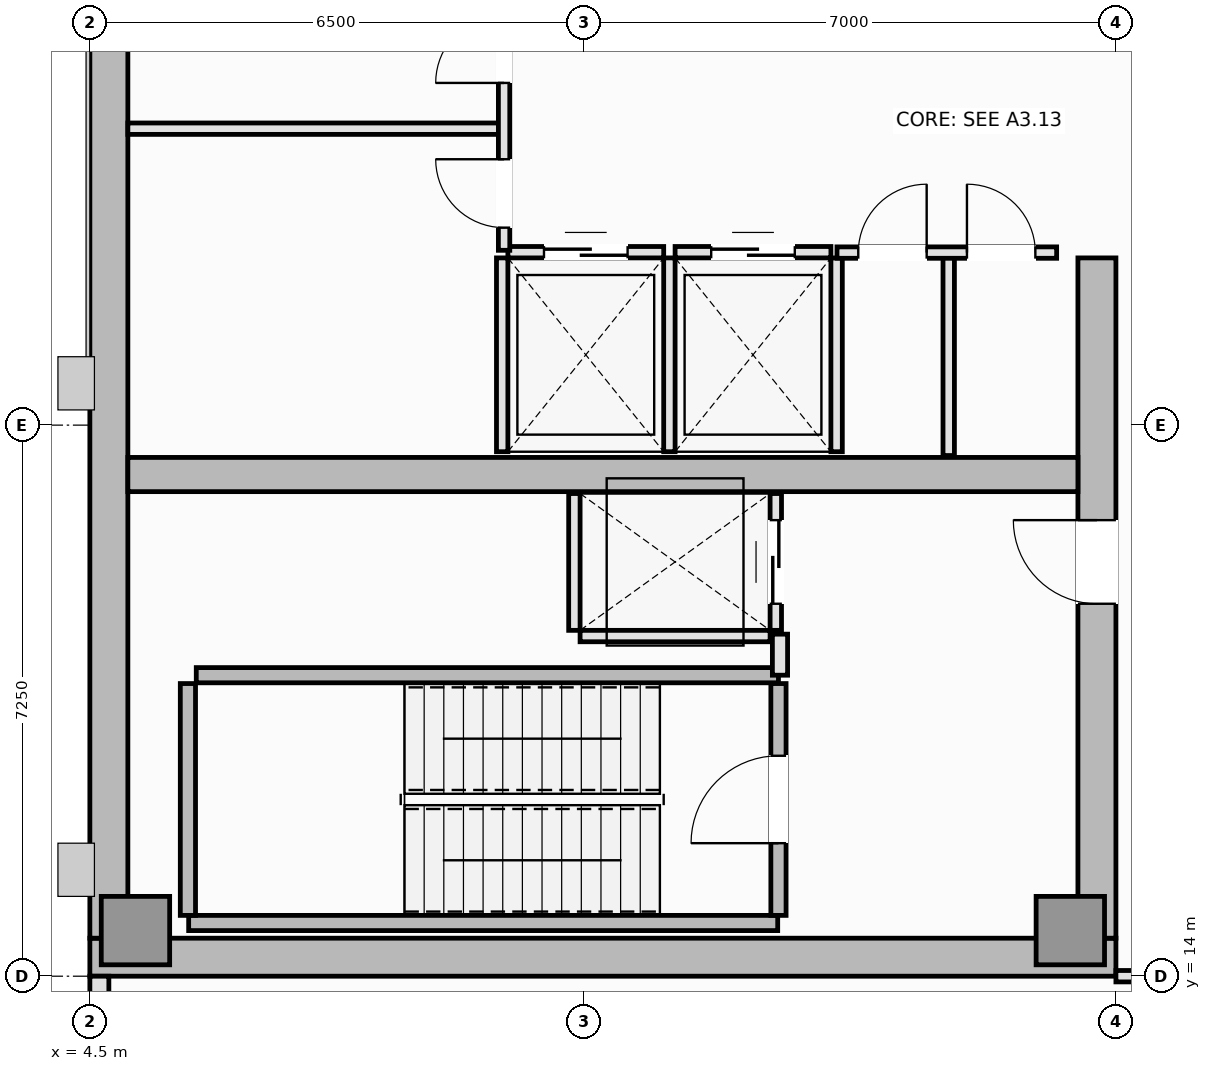
"""IFC4 building model, lengths in metres.
Left out: names, types, materials, properties, quantities, classifications, styles, units other than length and angle.
Written with IfcOpenShell. Run it as: python <this file> out.ifc"""

import sys

from ifc_helpers import new_model, si_unit, direction, frame, frame_2d, origin, origin_2d, place, context, subcontext, project, spatial, rectangle, extrude, element, fill, save


model = new_model("IFC4")
c1 = context("Model", 3, precision=1e-05, world=origin(), true_north=direction((0.0, 1.0)))
c2 = subcontext(c1, "Body", "Model", "MODEL_VIEW")
j1 = project(units=[si_unit("LENGTHUNIT", "METRE"), si_unit("PLANEANGLEUNIT", "RADIAN")], contexts=[c1])
p1 = place(None, origin())
s1 = spatial("IfcSite", under=j1, at=p1, CompositionType="ELEMENT")
p2 = place(p1, origin())
s2 = spatial("IfcBuilding", under=s1, at=p2, CompositionType="ELEMENT")
p3 = place(p2, frame((0.0, 0.0, 244.85)))
s3 = spatial("IfcBuildingStorey", under=s2, at=p3, CompositionType="ELEMENT", Elevation=244.85)
p4 = place(p3, frame((4.5, 14.25, 0.0), z_axis=(0.0, 0.0, 1.0), x_axis=(1.0, 0.0, 0.0)))
e1 = element("IfcWall", 1, at=p4, inside=s3, PredefinedType="SHEAR", context=c2, shape_type="SweptSolid", body=[
    extrude(rectangle(XDim=13.5, YDim=0.5, at=frame_2d((6.75, 0.0))), origin(), (0.0, 0.0, 1.0), 4.4),
])
p5 = place(p3, frame((4.75, 14.5, 0.0), z_axis=(0.0, 0.0, 1.0), x_axis=(0.0, 1.0, 0.0)))
e2 = element("IfcWall", 2, at=p5, inside=s3, PredefinedType="SHEAR", context=c2, shape_type="SweptSolid", body=[
    extrude(rectangle(XDim=21.5, YDim=0.5, at=frame_2d((10.75, 0.0))), origin(), (0.0, 0.0, 1.0), 4.4),
])
p6 = place(p3, frame((17.75, 14.5, 0.0), z_axis=(0.0, 0.0, 1.0), x_axis=(0.0, 1.0, 0.0)))
e3 = element("IfcWall", 3, at=p6, inside=s3, PredefinedType="SHEAR", context=c2, shape_type="SweptSolid", body=[
    extrude(rectangle(XDim=8.95, YDim=0.5, at=frame_2d((4.475, 0.0))), origin(), (0.0, 0.0, 1.0), 4.4),
])
p7 = place(p6, frame((4.4, 0.0, 0.0)))
e4 = element("IfcOpeningElement", 4, at=p7, cuts=e3, PredefinedType="OPENING", context=c2, shape_type="SweptSolid", body=[
    extrude(rectangle(XDim=1.1, YDim=2.15, at=frame_2d((0.55, 1.075))), frame((0.0, 0.26, 0.0), z_axis=(0.0, -1.0, 0.0), x_axis=(1.0, 0.0, 0.0)), (0.0, 0.0, 1.0), 0.52),
])
p8 = place(p3, frame((5.0, 20.6, 0.0), z_axis=(0.0, 0.0, 1.0), x_axis=(1.0, 0.0, 0.0)))
e5 = element("IfcWall", 5, at=p8, inside=s3, PredefinedType="SHEAR", context=c2, shape_type="SweptSolid", body=[
    extrude(rectangle(XDim=12.5, YDim=0.45, at=frame_2d((6.25, 0.0))), origin(), (0.0, 0.0, 1.0), 4.4),
])
for number, where, z_axis, x_axis in (
    (6, (5.1, 14.6, 0.0), (0.0, 0.0, 1.0), (1.0, 0.0, 0.0)),
    (7, (17.4, 14.6, 0.0), (0.0, 0.0, 1.0), (1.0, 0.0, 0.0)),
):
    element("IfcColumn", number, at=place(p3, frame(where, z_axis=z_axis, x_axis=x_axis)), inside=s3, PredefinedType="PILASTER", context=c2, shape_type="SweptSolid", body=[
        extrude(rectangle(XDim=0.9, YDim=0.9, at=origin_2d()), origin(), (0.0, 0.0, 1.0), 4.4),
    ])
p9 = place(p3, frame((4.625, 14.0, 0.0), z_axis=(0.0, 0.0, 1.0), x_axis=(0.0, -1.0, 0.0)))
e8 = element("IfcWall", 8, at=p9, inside=s3, PredefinedType="SOLIDWALL", context=c2, shape_type="SweptSolid", body=[
    extrude(rectangle(XDim=3.4, YDim=0.25, at=frame_2d((1.7, 0.0))), origin(), (0.0, 0.0, 1.0), 4.24),
])
p10 = place(p9, frame((0.6, 0.0, 0.9)))
e9 = element("IfcOpeningElement", 9, at=p10, cuts=e8, PredefinedType="OPENING", context=c2, shape_type="SweptSolid", body=[
    extrude(rectangle(XDim=2.2, YDim=1.8, at=frame_2d((1.1, 0.9))), frame((0.0, 0.135, 0.0), z_axis=(0.0, -1.0, 0.0), x_axis=(1.0, 0.0, 0.0)), (0.0, 0.0, 1.0), 0.27),
])
p11 = place(p3, frame((5.8, 14.7, 0.0), z_axis=(0.0, 0.0, 1.0), x_axis=(1.0, 0.0, 0.0)))
e10 = element("IfcWall", 10, at=p11, inside=s3, PredefinedType="SOLIDWALL", context=c2, shape_type="SweptSolid", body=[
    extrude(rectangle(XDim=7.75, YDim=0.2, at=frame_2d((3.875, 0.0))), origin(), (0.0, 0.0, 1.0), 4.4),
])
p12 = place(p3, frame((5.79, 14.8, 0.0), z_axis=(0.0, 0.0, 1.0), x_axis=(0.0, 1.0, 0.0)))
e11 = element("IfcWall", 11, at=p12, inside=s3, PredefinedType="SOLIDWALL", context=c2, shape_type="SweptSolid", body=[
    extrude(rectangle(XDim=3.05, YDim=0.2, at=frame_2d((1.525, 0.0))), origin(), (0.0, 0.0, 1.0), 4.4),
])
p13 = place(p3, frame((5.9, 17.96, 0.0), z_axis=(0.0, 0.0, 1.0), x_axis=(1.0, 0.0, 0.0)))
e12 = element("IfcWall", 12, at=p13, inside=s3, PredefinedType="SOLIDWALL", context=c2, shape_type="SweptSolid", body=[
    extrude(rectangle(XDim=7.66, YDim=0.2, at=frame_2d((3.83, 0.0))), origin(), (0.0, 0.0, 1.0), 4.4),
])
p14 = place(p3, frame((13.56, 14.8, 0.0), z_axis=(0.0, 0.0, 1.0), x_axis=(0.0, 1.0, 0.0)))
e13 = element("IfcWall", 13, at=p14, inside=s3, PredefinedType="SOLIDWALL", context=c2, shape_type="SweptSolid", body=[
    extrude(rectangle(XDim=3.05, YDim=0.2, at=frame_2d((1.525, 0.0))), origin(), (0.0, 0.0, 1.0), 4.4),
])
p15 = place(p14, frame((0.95, 0.0, 0.0)))
e14 = element("IfcOpeningElement", 14, at=p15, cuts=e13, PredefinedType="OPENING", context=c2, shape_type="SweptSolid", body=[
    extrude(rectangle(XDim=1.15, YDim=2.15, at=frame_2d((0.575, 1.075))), frame((0.0, 0.11, 0.0), z_axis=(0.0, -1.0, 0.0), x_axis=(1.0, 0.0, 0.0)), (0.0, 0.0, 1.0), 0.22),
])
p16 = place(p3, frame((10.0, 23.525, 0.0), z_axis=(0.0, 0.0, 1.0), x_axis=(1.0, 0.0, 0.0)))
e15 = element("IfcWall", 15, at=p16, inside=s3, PredefinedType="PARTITIONING", context=c2, shape_type="SweptSolid", body=[
    extrude(rectangle(XDim=2.05, YDim=0.15, at=frame_2d((1.025, 0.0))), origin(), (0.0, 0.0, 1.0), 4.24),
])
p17 = place(p16, frame((0.475, 0.0, 0.0)))
e16 = element("IfcOpeningElement", 16, at=p17, cuts=e15, PredefinedType="OPENING", context=c2, shape_type="SweptSolid", body=[
    extrude(rectangle(XDim=1.1, YDim=2.2, at=frame_2d((0.55, 1.1))), frame((0.0, 0.085, 0.0), z_axis=(0.0, -1.0, 0.0), x_axis=(1.0, 0.0, 0.0)), (0.0, 0.0, 1.0), 0.17),
])
for number, where, z_axis, x_axis in (
    (17, (9.925, 20.9, 0.0), (0.0, 0.0, 1.0), (0.0, 1.0, 0.0)),
    (18, (12.125, 20.9, 0.0), (0.0, 0.0, 1.0), (0.0, 1.0, 0.0)),
):
    element("IfcWall", number, at=place(p3, frame(where, z_axis=z_axis, x_axis=x_axis)), inside=s3, PredefinedType="PARTITIONING", context=c2, shape_type="SweptSolid", body=[
        extrude(rectangle(XDim=2.55, YDim=0.15, at=frame_2d((1.275, 0.0))), origin(), (0.0, 0.0, 1.0), 4.24),
    ])
p18 = place(p3, frame((12.2, 23.525, 0.0), z_axis=(0.0, 0.0, 1.0), x_axis=(1.0, 0.0, 0.0)))
e19 = element("IfcWall", 19, at=p18, inside=s3, PredefinedType="PARTITIONING", context=c2, shape_type="SweptSolid", body=[
    extrude(rectangle(XDim=2.05, YDim=0.15, at=frame_2d((1.025, 0.0))), origin(), (0.0, 0.0, 1.0), 4.24),
])
p19 = place(p18, frame((0.475, 0.0, 0.0)))
e20 = element("IfcOpeningElement", 20, at=p19, cuts=e19, PredefinedType="OPENING", context=c2, shape_type="SweptSolid", body=[
    extrude(rectangle(XDim=1.1, YDim=2.2, at=frame_2d((0.55, 1.1))), frame((0.0, 0.085, 0.0), z_axis=(0.0, -1.0, 0.0), x_axis=(1.0, 0.0, 0.0)), (0.0, 0.0, 1.0), 0.17),
])
p20 = place(p3, frame((14.325, 20.9, 0.0), z_axis=(0.0, 0.0, 1.0), x_axis=(0.0, 1.0, 0.0)))
e21 = element("IfcWall", 21, at=p20, inside=s3, PredefinedType="PARTITIONING", context=c2, shape_type="SweptSolid", body=[
    extrude(rectangle(XDim=2.55, YDim=0.15, at=frame_2d((1.275, 0.0))), origin(), (0.0, 0.0, 1.0), 4.24),
])
p21 = place(p3, frame((10.95, 18.475, 0.0), z_axis=(0.0, 0.0, 1.0), x_axis=(1.0, 0.0, 0.0)))
e22 = element("IfcWall", 22, at=p21, inside=s3, PredefinedType="PARTITIONING", context=c2, shape_type="SweptSolid", body=[
    extrude(rectangle(XDim=2.5, YDim=0.15, at=frame_2d((1.25, 0.0))), origin(), (0.0, 0.0, 1.0), 4.24),
])
p22 = place(p3, frame((10.875, 18.55, 0.0), z_axis=(0.0, 0.0, 1.0), x_axis=(0.0, 1.0, 0.0)))
e23 = element("IfcWall", 23, at=p22, inside=s3, PredefinedType="PARTITIONING", context=c2, shape_type="SweptSolid", body=[
    extrude(rectangle(XDim=1.8, YDim=0.15, at=frame_2d((0.9, 0.0))), origin(), (0.0, 0.0, 1.0), 4.24),
])
p23 = place(p3, frame((13.525, 18.55, 0.0), z_axis=(0.0, 0.0, 1.0), x_axis=(0.0, 1.0, 0.0)))
e24 = element("IfcWall", 24, at=p23, inside=s3, PredefinedType="PARTITIONING", context=c2, shape_type="SweptSolid", body=[
    extrude(rectangle(XDim=1.8, YDim=0.15, at=frame_2d((0.9, 0.0))), origin(), (0.0, 0.0, 1.0), 4.24),
])
p24 = place(p23, frame((0.35, 0.0, 0.0)))
e25 = element("IfcOpeningElement", 25, at=p24, cuts=e24, PredefinedType="OPENING", context=c2, shape_type="SweptSolid", body=[
    extrude(rectangle(XDim=1.1, YDim=2.2, at=frame_2d((0.55, 1.1))), frame((0.0, 0.085, 0.0), z_axis=(0.0, -1.0, 0.0), x_axis=(1.0, 0.0, 0.0)), (0.0, 0.0, 1.0), 0.17),
])
p25 = place(p3, frame((13.58, 17.96, 0.0), z_axis=(0.0, 0.0, 1.0), x_axis=(0.0, 1.0, 0.0)))
e26 = element("IfcWall", 26, at=p25, inside=s3, PredefinedType="PARTITIONING", context=c2, shape_type="SweptSolid", body=[
    extrude(rectangle(XDim=0.54, YDim=0.2, at=frame_2d((0.27, 0.0))), origin(), (0.0, 0.0, 1.0), 4.24),
])
p26 = place(p3, frame((5.0, 25.15, 0.0), z_axis=(0.0, 0.0, 1.0), x_axis=(1.0, 0.0, 0.0)))
e27 = element("IfcWall", 27, at=p26, inside=s3, PredefinedType="PARTITIONING", context=c2, shape_type="SweptSolid", body=[
    extrude(rectangle(XDim=4.95, YDim=0.15, at=frame_2d((2.475, 0.0))), origin(), (0.0, 0.0, 1.0), 4.24),
])
p27 = place(p3, frame((9.95, 23.55, 0.0), z_axis=(0.0, 0.0, 1.0), x_axis=(0.0, 1.0, 0.0)))
e28 = element("IfcWall", 28, at=p27, inside=s3, PredefinedType="PARTITIONING", context=c2, shape_type="SweptSolid", body=[
    extrude(rectangle(XDim=3.4, YDim=0.15, at=frame_2d((1.7, 0.0))), origin(), (0.0, 0.0, 1.0), 4.24),
])
p28 = place(p27, frame((0.298, 0.0, 0.0)))
e29 = element("IfcOpeningElement", 29, at=p28, cuts=e28, PredefinedType="OPENING", context=c2, shape_type="SweptSolid", body=[
    extrude(rectangle(XDim=0.9, YDim=2.1, at=frame_2d((0.45, 1.05))), frame((0.0, 0.085, 0.0), z_axis=(0.0, -1.0, 0.0), x_axis=(1.0, 0.0, 0.0)), (0.0, 0.0, 1.0), 0.17),
])
p29 = place(p27, frame((2.202, 0.0, 0.0)))
e30 = element("IfcOpeningElement", 30, at=p29, cuts=e28, PredefinedType="OPENING", context=c2, shape_type="SweptSolid", body=[
    extrude(rectangle(XDim=0.9, YDim=2.1, at=frame_2d((0.45, 1.05))), frame((0.0, 0.085, 0.0), z_axis=(0.0, -1.0, 0.0), x_axis=(1.0, 0.0, 0.0)), (0.0, 0.0, 1.0), 0.17),
])
p30 = place(p3, frame((15.8, 20.85, 0.0), z_axis=(0.0, 0.0, 1.0), x_axis=(0.0, 1.0, 0.0)))
e31 = element("IfcWall", 31, at=p30, inside=s3, PredefinedType="PARTITIONING", context=c2, shape_type="SweptSolid", body=[
    extrude(rectangle(XDim=2.67, YDim=0.15, at=frame_2d((1.335, 0.0))), origin(), (0.0, 0.0, 1.0), 4.24),
])
p31 = place(p3, frame((14.33, 23.52, 0.0), z_axis=(0.0, 0.0, 1.0), x_axis=(1.0, 0.0, 0.0)))
e32 = element("IfcWall", 32, at=p31, inside=s3, PredefinedType="PARTITIONING", context=c2, shape_type="SweptSolid", body=[
    extrude(rectangle(XDim=2.89, YDim=0.15, at=frame_2d((1.445, 0.0))), origin(), (0.0, 0.0, 1.0), 4.24),
])
p32 = place(p31, frame((0.28, 0.0, 0.0)))
e33 = element("IfcOpeningElement", 33, at=p32, cuts=e32, PredefinedType="OPENING", context=c2, shape_type="SweptSolid", body=[
    extrude(rectangle(XDim=0.9, YDim=2.1, at=frame_2d((0.45, 1.05))), frame((0.0, 0.085, 0.0), z_axis=(0.0, -1.0, 0.0), x_axis=(1.0, 0.0, 0.0)), (0.0, 0.0, 1.0), 0.17),
])
p33 = place(p31, frame((1.71, 0.0, 0.0)))
e34 = element("IfcOpeningElement", 34, at=p33, cuts=e32, PredefinedType="OPENING", context=c2, shape_type="SweptSolid", body=[
    extrude(rectangle(XDim=0.9, YDim=2.1, at=frame_2d((0.45, 1.05))), frame((0.0, 0.085, 0.0), z_axis=(0.0, -1.0, 0.0), x_axis=(1.0, 0.0, 0.0)), (0.0, 0.0, 1.0), 0.17),
])
p34 = place(p3, frame((18.0, 14.0, 0.0), z_axis=(0.0, 0.0, 1.0), x_axis=(1.0, 0.0, 0.0)))
e35 = element("IfcWall", 35, at=p34, inside=s3, PredefinedType="PARTITIONING", context=c2, shape_type="SweptSolid", body=[
    extrude(rectangle(XDim=2.2, YDim=0.15, at=frame_2d((1.1, 0.0))), origin(), (0.0, 0.0, 1.0), 4.24),
])
p35 = place(p34, frame((0.65, 0.0, 0.0)))
e36 = element("IfcOpeningElement", 36, at=p35, cuts=e35, PredefinedType="OPENING", context=c2, shape_type="SweptSolid", body=[
    extrude(rectangle(XDim=0.9, YDim=2.1, at=frame_2d((0.45, 1.05))), frame((0.0, 0.085, 0.0), z_axis=(0.0, -1.0, 0.0), x_axis=(1.0, 0.0, 0.0)), (0.0, 0.0, 1.0), 0.17),
])
p36 = place(p15, origin())
e37 = element("IfcDoor", 37, at=p36, inside=s3, OperationType="SINGLE_SWING_LEFT", PredefinedType="DOOR", context=c2, shape_type="SweptSolid", body=[
    extrude(rectangle(XDim=1.15, YDim=2.15, at=frame_2d((0.575, 1.075))), frame((0.0, 0.025, 0.0), z_axis=(0.0, -1.0, 0.0), x_axis=(1.0, 0.0, 0.0)), (0.0, 0.0, 1.0), 0.05),
])
fill(e14, e37)
p37 = place(p17, origin())
e38 = element("IfcDoor", 38, at=p37, inside=s3, OperationType="DOUBLE_DOOR_SLIDING", PredefinedType="DOOR", context=c2, shape_type="SweptSolid", body=[
    extrude(rectangle(XDim=1.1, YDim=2.2, at=frame_2d((0.55, 1.1))), frame((0.0, 0.025, 0.0), z_axis=(0.0, -1.0, 0.0), x_axis=(1.0, 0.0, 0.0)), (0.0, 0.0, 1.0), 0.05),
])
fill(e16, e38)
p38 = place(p19, origin())
e39 = element("IfcDoor", 39, at=p38, inside=s3, OperationType="DOUBLE_DOOR_SLIDING", PredefinedType="DOOR", context=c2, shape_type="SweptSolid", body=[
    extrude(rectangle(XDim=1.1, YDim=2.2, at=frame_2d((0.55, 1.1))), frame((0.0, 0.025, 0.0), z_axis=(0.0, -1.0, 0.0), x_axis=(1.0, 0.0, 0.0)), (0.0, 0.0, 1.0), 0.05),
])
fill(e20, e39)
p39 = place(p24, origin())
e40 = element("IfcDoor", 40, at=p39, inside=s3, OperationType="DOUBLE_DOOR_SLIDING", PredefinedType="DOOR", context=c2, shape_type="SweptSolid", body=[
    extrude(rectangle(XDim=1.1, YDim=2.2, at=frame_2d((0.55, 1.1))), frame((0.0, 0.025, 0.0), z_axis=(0.0, -1.0, 0.0), x_axis=(1.0, 0.0, 0.0)), (0.0, 0.0, 1.0), 0.05),
])
fill(e25, e40)
p40 = place(p7, origin())
e41 = element("IfcDoor", 41, at=p40, inside=s3, OperationType="SINGLE_SWING_RIGHT", PredefinedType="DOOR", context=c2, shape_type="SweptSolid", body=[
    extrude(rectangle(XDim=1.1, YDim=2.15, at=frame_2d((0.55, 1.075))), frame((0.0, 0.025, 0.0), z_axis=(0.0, -1.0, 0.0), x_axis=(1.0, 0.0, 0.0)), (0.0, 0.0, 1.0), 0.05),
])
fill(e4, e41)
p41 = place(p28, origin())
e42 = element("IfcDoor", 42, at=p41, inside=s3, OperationType="SINGLE_SWING_RIGHT", PredefinedType="DOOR", context=c2, shape_type="SweptSolid", body=[
    extrude(rectangle(XDim=0.9, YDim=2.1, at=frame_2d((0.45, 1.05))), frame((0.0, 0.025, 0.0), z_axis=(0.0, -1.0, 0.0), x_axis=(1.0, 0.0, 0.0)), (0.0, 0.0, 1.0), 0.05),
])
fill(e29, e42)
p42 = place(p29, origin())
e43 = element("IfcDoor", 43, at=p42, inside=s3, OperationType="SINGLE_SWING_LEFT", PredefinedType="DOOR", context=c2, shape_type="SweptSolid", body=[
    extrude(rectangle(XDim=0.9, YDim=2.1, at=frame_2d((0.45, 1.05))), frame((0.0, 0.025, 0.0), z_axis=(0.0, -1.0, 0.0), x_axis=(1.0, 0.0, 0.0)), (0.0, 0.0, 1.0), 0.05),
])
fill(e30, e43)
p43 = place(p32, origin())
e44 = element("IfcDoor", 44, at=p43, inside=s3, OperationType="SINGLE_SWING_RIGHT", PredefinedType="DOOR", context=c2, shape_type="SweptSolid", body=[
    extrude(rectangle(XDim=0.9, YDim=2.1, at=frame_2d((0.45, 1.05))), frame((0.0, 0.025, 0.0), z_axis=(0.0, -1.0, 0.0), x_axis=(1.0, 0.0, 0.0)), (0.0, 0.0, 1.0), 0.05),
])
fill(e33, e44)
p44 = place(p33, origin())
e45 = element("IfcDoor", 45, at=p44, inside=s3, OperationType="SINGLE_SWING_LEFT", PredefinedType="DOOR", context=c2, shape_type="SweptSolid", body=[
    extrude(rectangle(XDim=0.9, YDim=2.1, at=frame_2d((0.45, 1.05))), frame((0.0, 0.025, 0.0), z_axis=(0.0, -1.0, 0.0), x_axis=(1.0, 0.0, 0.0)), (0.0, 0.0, 1.0), 0.05),
])
fill(e34, e45)
save(model, sys.argv[1])
